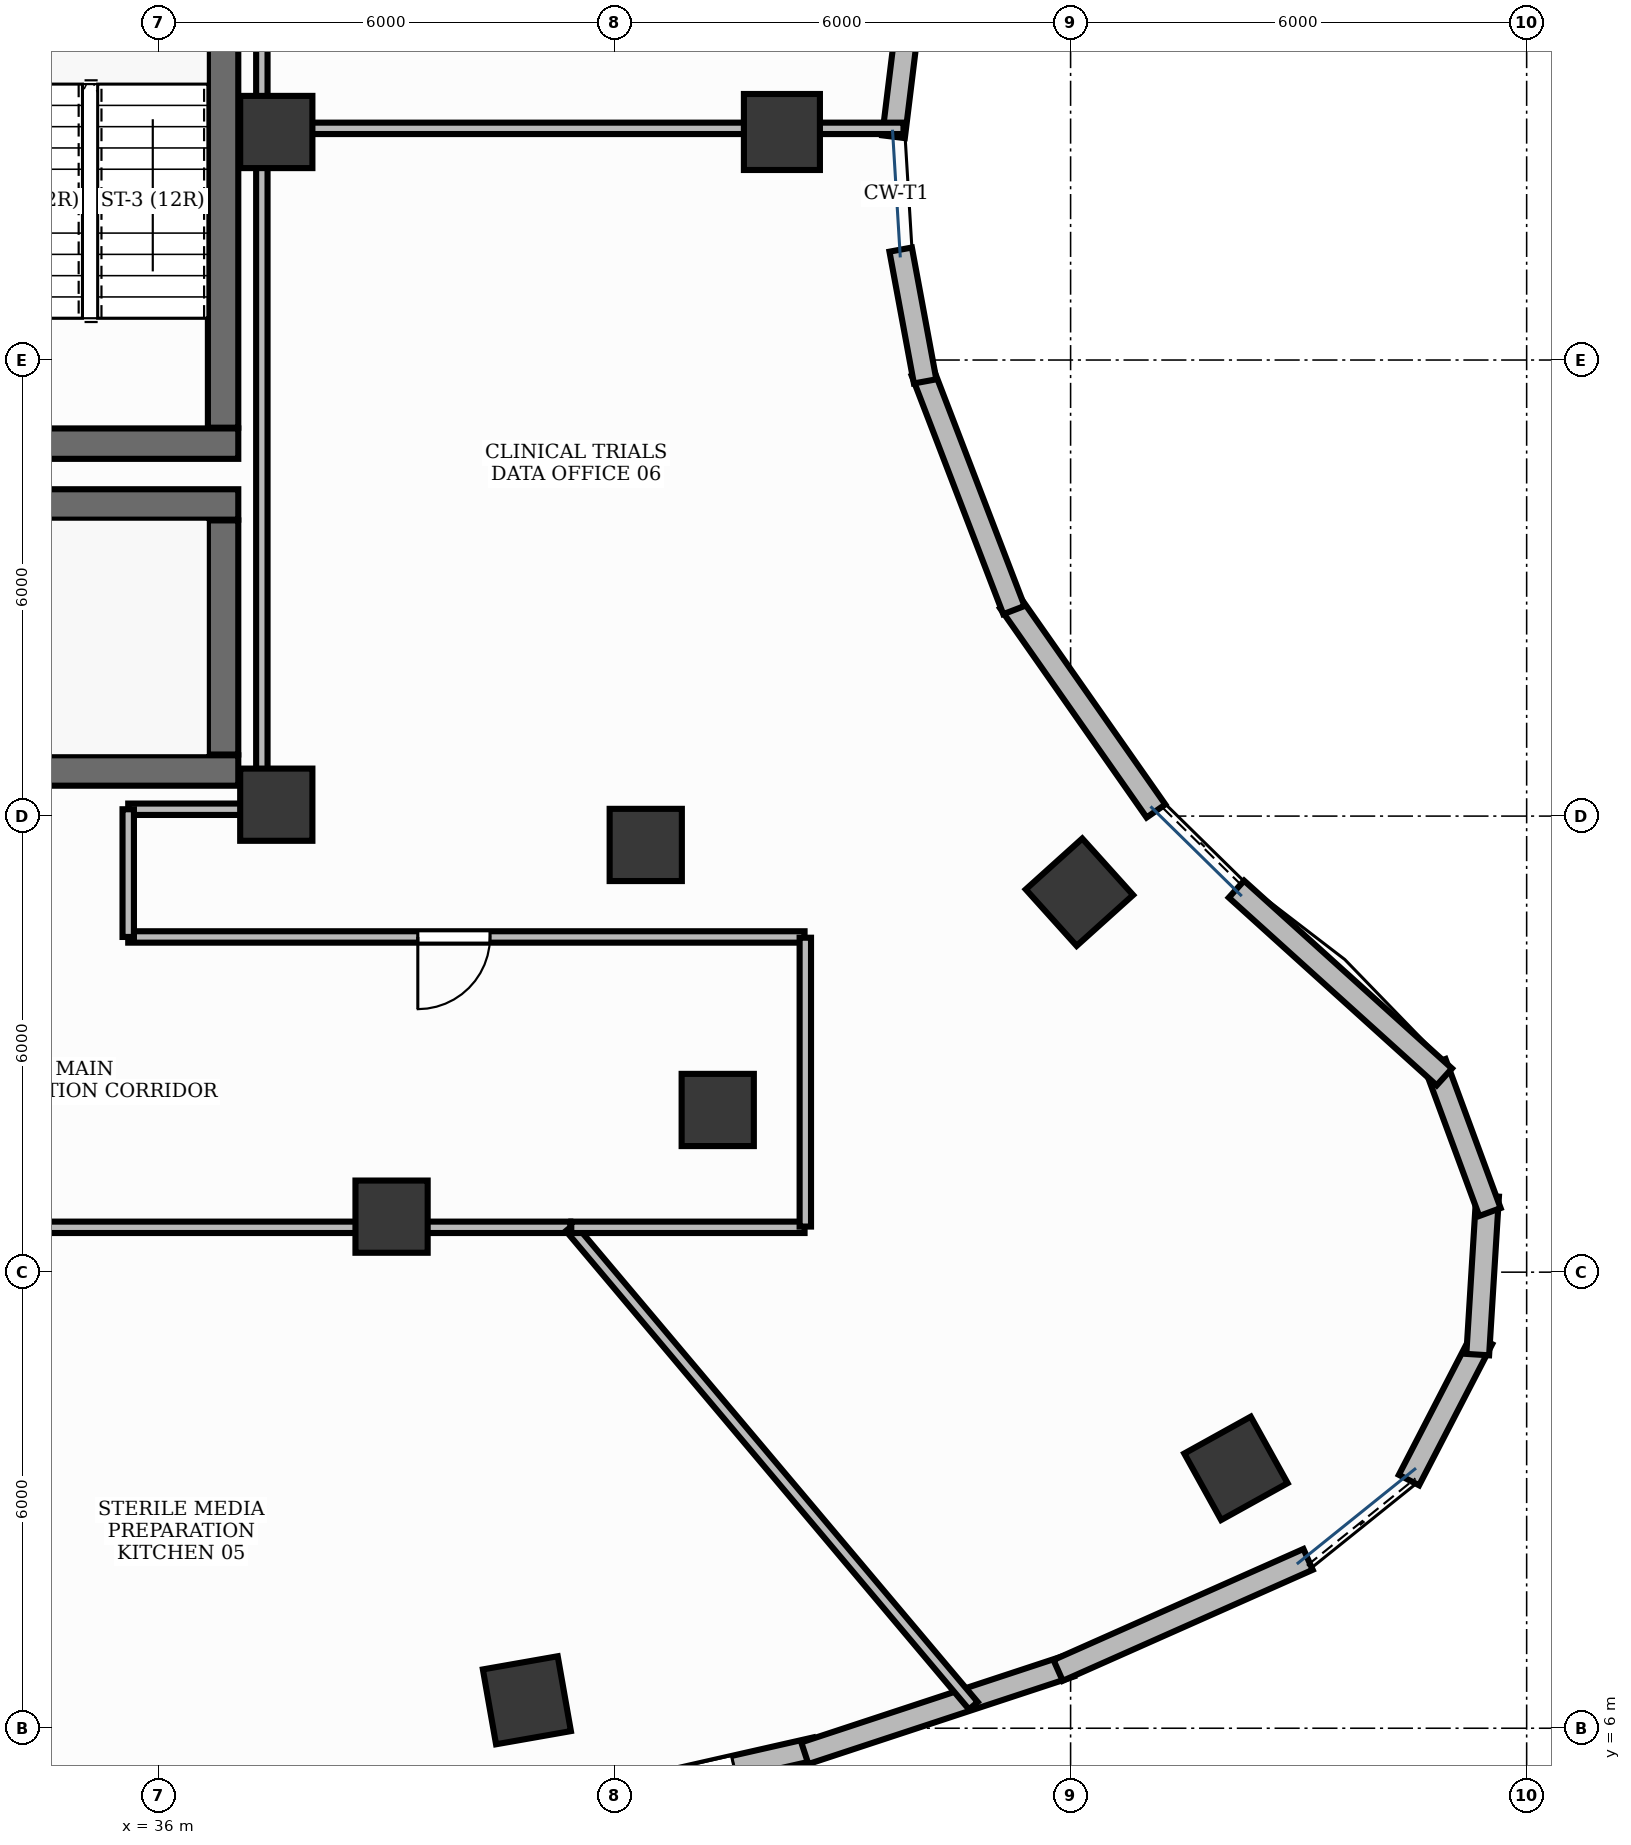
"""IFC4 building model, lengths in metres.
Left out: names, types, materials, properties, quantities, classifications, styles, units other than length and angle.
Written with IfcOpenShell. Run it as: python <this file> out.ifc"""

import sys

from ifc_helpers import new_model, si_unit, direction, frame, frame_2d, origin, origin_2d, place, context, subcontext, project, spatial, rectangle, extrude, element, fill, save


model = new_model("IFC4")
c1 = context("Model", 3, precision=1e-05, world=origin(), true_north=direction((0.0, 1.0)))
c2 = subcontext(c1, "Body", "Model", "MODEL_VIEW")
j1 = project(units=[si_unit("LENGTHUNIT", "METRE"), si_unit("PLANEANGLEUNIT", "RADIAN")], contexts=[c1])
p1 = place(None, origin())
s1 = spatial("IfcSite", under=j1, at=p1, CompositionType="ELEMENT")
p2 = place(p1, origin())
s2 = spatial("IfcBuilding", under=s1, at=p2, CompositionType="ELEMENT")
p3 = place(p2, frame((0.0, 0.0, 226.8)))
s3 = spatial("IfcBuildingStorey", under=s2, at=p3, CompositionType="ELEMENT", Elevation=226.8)
p4 = place(p3, frame((28.852, 18.6, 0.0), z_axis=(0.0, 0.0, 1.0), x_axis=(1.0, 0.0, 0.0)))
e1 = element("IfcWall", 1, at=p4, inside=s3, PredefinedType="SHEAR", context=c2, shape_type="SweptSolid", body=[
    extrude(rectangle(XDim=8.198, YDim=0.4, at=frame_2d((4.099, 0.0))), origin(), (0.0, 0.0, 1.0), 3.9),
])
p5 = place(p3, frame((28.4, 22.1, 0.0), z_axis=(0.0, 0.0, 1.0), x_axis=(1.0, 0.0, 0.0)))
e2 = element("IfcWall", 2, at=p5, inside=s3, PredefinedType="SHEAR", context=c2, shape_type="SweptSolid", body=[
    extrude(rectangle(XDim=8.65, YDim=0.4, at=frame_2d((4.325, 0.0))), origin(), (0.0, 0.0, 1.0), 3.9),
])
p6 = place(p3, frame((36.85, 18.81, 0.0), z_axis=(0.0, 0.0, 1.0), x_axis=(0.0, 1.0, 0.0)))
e3 = element("IfcWall", 3, at=p6, inside=s3, PredefinedType="SHEAR", context=c2, shape_type="SweptSolid", body=[
    extrude(rectangle(XDim=3.08, YDim=0.4, at=frame_2d((1.54, 0.0))), origin(), (0.0, 0.0, 1.0), 3.9),
])
p7 = place(p3, frame((33.15, 22.9, 0.0), z_axis=(0.0, 0.0, 1.0), x_axis=(1.0, 0.0, 0.0)))
e4 = element("IfcWall", 4, at=p7, inside=s3, PredefinedType="SHEAR", context=c2, shape_type="SweptSolid", body=[
    extrude(rectangle(XDim=3.9, YDim=0.4, at=frame_2d((1.95, 0.0))), origin(), (0.0, 0.0, 1.0), 3.9),
])
p8 = place(p3, frame((36.85, 23.11, 0.0), z_axis=(0.0, 0.0, 1.0), x_axis=(0.0, 1.0, 0.0)))
e5 = element("IfcWall", 5, at=p8, inside=s3, PredefinedType="SHEAR", context=c2, shape_type="SweptSolid", body=[
    extrude(rectangle(XDim=7.78, YDim=0.4, at=frame_2d((3.89, 0.0))), origin(), (0.0, 0.0, 1.0), 3.9),
])
for number, where, z_axis, x_axis in (
    (6, (37.55, 18.15, -0.0), (0.0, 0.0, 1.0), (1.0, 0.0, 0.0)),
    (7, (37.55, 27.0, -0.0), (0.0, 0.0, 1.0), (1.0, 0.0, 0.0)),
):
    element("IfcColumn", number, at=place(p3, frame(where, z_axis=z_axis, x_axis=x_axis)), inside=s3, PredefinedType="PILASTER", context=c2, shape_type="SweptSolid", body=[
        extrude(rectangle(XDim=0.95, YDim=0.95, at=origin_2d()), origin(), (0.0, 0.0, 1.0), 3.901),
    ])
p9 = place(p3, frame((40.847, 6.368, -0.0), z_axis=(0.0, 0.0, 1.0), x_axis=(0.984868307662, 0.173304404339, 0.0)))
e8 = element("IfcColumn", 8, at=p9, inside=s3, PredefinedType="COLUMN", context=c2, shape_type="SweptSolid", body=[
    extrude(rectangle(XDim=1.0, YDim=1.0, at=origin_2d()), origin(), (0.0, 0.0, 1.0), 3.901),
])
p10 = place(p3, frame((39.067, 12.73, -0.0), z_axis=(0.0, 0.0, 1.0), x_axis=(1.0, 0.0, 0.0)))
e9 = element("IfcColumn", 9, at=p10, inside=s3, PredefinedType="COLUMN", context=c2, shape_type="SweptSolid", body=[
    extrude(rectangle(XDim=0.95, YDim=0.95, at=origin_2d()), origin(), (0.0, 0.0, 1.0), 3.901),
])
p11 = place(p3, frame((50.176, 9.419, -0.0), z_axis=(0.0, 0.0, 1.0), x_axis=(0.874535078577, 0.484962262797, 0.0)))
e10 = element("IfcColumn", 10, at=p11, inside=s3, PredefinedType="COLUMN", context=c2, shape_type="SweptSolid", body=[
    extrude(rectangle(XDim=1.0, YDim=1.0, at=origin_2d()), origin(), (0.0, 0.0, 1.0), 3.901),
])
p12 = place(p3, frame((43.358, 14.134, -0.0), z_axis=(0.0, 0.0, 1.0), x_axis=(1.0, 0.0, 0.0)))
e11 = element("IfcColumn", 11, at=p12, inside=s3, PredefinedType="COLUMN", context=c2, shape_type="SweptSolid", body=[
    extrude(rectangle(XDim=0.95, YDim=0.95, at=origin_2d()), origin(), (0.0, 0.0, 1.0), 3.901),
])
p13 = place(p3, frame((48.116, 16.999, -0.0), z_axis=(0.0, 0.0, 1.0), x_axis=(-0.669130606359, 0.743144825477, 0.0)))
e12 = element("IfcColumn", 12, at=p13, inside=s3, PredefinedType="COLUMN", context=c2, shape_type="SweptSolid", body=[
    extrude(rectangle(XDim=1.0, YDim=1.0, at=origin_2d()), origin(), (0.0, 0.0, 1.0), 3.901),
])
p14 = place(p3, frame((42.411, 17.62, -0.0), z_axis=(0.0, 0.0, 1.0), x_axis=(1.0, 0.0, 0.0)))
e13 = element("IfcColumn", 13, at=p14, inside=s3, PredefinedType="COLUMN", context=c2, shape_type="SweptSolid", body=[
    extrude(rectangle(XDim=0.95, YDim=0.95, at=origin_2d()), origin(), (0.0, 0.0, 1.0), 3.901),
])
p15 = place(p3, frame((44.202, 27.0, -0.0), z_axis=(0.0, 0.0, 1.0), x_axis=(0.0, 1.0, 0.0)))
e14 = element("IfcColumn", 14, at=p15, inside=s3, PredefinedType="COLUMN", context=c2, shape_type="SweptSolid", body=[
    extrude(rectangle(XDim=1.0, YDim=1.0, at=origin_2d()), origin(), (0.0, 0.0, 1.0), 3.901),
])
p16 = place(p3, frame((41.036, 4.914, 0.0), z_axis=(0.0, 0.0, 1.0), x_axis=(0.975237678872, 0.221159376263, 0.0)))
e15 = element("IfcWall", 15, at=p16, inside=s3, PredefinedType="STANDARD", context=c2, shape_type="SweptSolid", body=[
    extrude(rectangle(XDim=3.703, YDim=0.3, at=frame_2d((1.851, 0.0))), origin(), (0.0, 0.0, 1.0), 3.9),
])
p17 = place(p16, frame((1.101, 0.0, 0.95)))
e16 = element("IfcOpeningElement", 16, at=p17, cuts=e15, PredefinedType="OPENING", context=c2, shape_type="SweptSolid", body=[
    extrude(rectangle(XDim=1.5, YDim=1.8, at=frame_2d((0.75, 0.9))), frame((0.0, 0.165, 0.0), z_axis=(0.0, -1.0, 0.0), x_axis=(1.0, 0.0, 0.0)), (0.0, 0.0, 1.0), 0.33),
])
p18 = place(p3, frame((44.504, 5.671, 0.0), z_axis=(0.0, 0.0, 1.0), x_axis=(0.94972655205, 0.313080622734, 0.0)))
e17 = element("IfcWall", 17, at=p18, inside=s3, PredefinedType="STANDARD", context=c2, shape_type="SweptSolid", body=[
    extrude(rectangle(XDim=3.679, YDim=0.3, at=frame_2d((1.84, 0.0))), origin(), (0.0, 0.0, 1.0), 3.9),
])
p19 = place(p3, frame((47.836, 6.761, 0.0), z_axis=(0.0, 0.0, 1.0), x_axis=(0.913940198441, 0.405848880341, 0.0)))
e18 = element("IfcWall", 18, at=p19, inside=s3, PredefinedType="STANDARD", context=c2, shape_type="SweptSolid", body=[
    extrude(rectangle(XDim=3.598, YDim=0.3, at=frame_2d((1.799, 0.0))), origin(), (0.0, 0.0, 1.0), 3.9),
])
p20 = place(p3, frame((52.452, 9.265, 0.0), z_axis=(0.0, 0.0, 1.0), x_axis=(0.459683297138, 0.888082916361, 0.0)))
e19 = element("IfcWall", 19, at=p20, inside=s3, PredefinedType="STANDARD", context=c2, shape_type="SweptSolid", body=[
    extrude(rectangle(XDim=2.092, YDim=0.3, at=frame_2d((1.046, 0.0))), origin(), (0.0, 0.0, 1.0), 3.9),
])
for number, where, z_axis, x_axis in (
    (20, (53.356, 10.915, 0.0), (0.0, 0.0, 1.0), (0.062, 0.998, 0.0)),
    (21, (53.517, 12.791, 0.0), (0.0, 0.0, 1.0), (-0.346, 0.938, 0.0)),
):
    element("IfcWall", number, at=place(p3, frame(where, z_axis=z_axis, x_axis=x_axis)), inside=s3, PredefinedType="STANDARD", context=c2, shape_type="SweptSolid", body=[
        extrude(rectangle(XDim=2.091, YDim=0.3, at=frame_2d((1.046, 0.0))), origin(), (0.0, 0.0, 1.0), 3.9),
    ])
p21 = place(p3, frame((52.917, 14.569, 0.0), z_axis=(0.0, 0.0, 1.0), x_axis=(-0.742037796493, 0.670358045059, 0.0)))
e22 = element("IfcWall", 22, at=p21, inside=s3, PredefinedType="STANDARD", context=c2, shape_type="SweptSolid", body=[
    extrude(rectangle(XDim=3.685, YDim=0.3, at=frame_2d((1.843, 0.0))), origin(), (0.0, 0.0, 1.0), 3.9),
])
p22 = place(p3, frame((49.123, 18.067, 0.0), z_axis=(0.0, 0.0, 1.0), x_axis=(-0.573598849051, 0.819136350291, 0.0)))
e23 = element("IfcWall", 23, at=p22, inside=s3, PredefinedType="STANDARD", context=c2, shape_type="SweptSolid", body=[
    extrude(rectangle(XDim=3.361, YDim=0.3, at=frame_2d((1.68, 0.0))), origin(), (0.0, 0.0, 1.0), 3.9),
])
p23 = place(p3, frame((47.254, 20.71, 0.0), z_axis=(0.0, 0.0, 1.0), x_axis=(-0.358365624917, 0.933581318835, 0.0)))
e24 = element("IfcWall", 24, at=p23, inside=s3, PredefinedType="STANDARD", context=c2, shape_type="SweptSolid", body=[
    extrude(rectangle(XDim=3.361, YDim=0.3, at=frame_2d((1.68, 0.0))), origin(), (0.0, 0.0, 1.0), 3.9),
])
p24 = place(p3, frame((46.086, 23.719, 0.0), z_axis=(0.0, 0.0, 1.0), x_axis=(-0.182198328631, 0.983261800867, 0.0)))
e25 = element("IfcWall", 25, at=p24, inside=s3, PredefinedType="STANDARD", context=c2, shape_type="SweptSolid", body=[
    extrude(rectangle(XDim=1.763, YDim=0.3, at=frame_2d((0.882, 0.0))), origin(), (0.0, 0.0, 1.0), 3.9),
])
p25 = place(p3, frame((45.67, 26.938, 0.0), z_axis=(0.0, 0.0, 1.0), x_axis=(0.121834797873, 0.992550392689, 0.0)))
e26 = element("IfcWall", 26, at=p25, inside=s3, PredefinedType="STANDARD", context=c2, shape_type="SweptSolid", body=[
    extrude(rectangle(XDim=3.361, YDim=0.3, at=frame_2d((1.68, 0.0))), origin(), (0.0, 0.0, 1.0), 3.9),
])
p26 = place(p3, frame((29.612, 12.59, 0.0), z_axis=(0.0, 0.0, 1.0), x_axis=(1.0, 0.0, 0.0)))
e27 = element("IfcWall", 27, at=p26, inside=s3, PredefinedType="PARTITIONING", context=c2, shape_type="SweptSolid", body=[
    extrude(rectangle(XDim=11.806, YDim=0.15, at=frame_2d((5.903, 0.0))), origin(), (0.0, 0.0, 1.0), 2.91),
])
p27 = place(p26, frame((0.24, 0.0, 0.0)))
e28 = element("IfcOpeningElement", 28, at=p27, cuts=e27, PredefinedType="OPENING", context=c2, shape_type="SweptSolid", body=[
    extrude(rectangle(XDim=0.95, YDim=2.15, at=frame_2d((0.475, 1.075))), frame((0.0, 0.09, 0.0), z_axis=(0.0, -1.0, 0.0), x_axis=(1.0, 0.0, 0.0)), (0.0, 0.0, 1.0), 0.18),
])
p28 = place(p3, frame((44.5, 16.41, 0.0), z_axis=(0.0, 0.0, 1.0), x_axis=(-1.0, 0.0, 0.0)))
e29 = element("IfcWall", 29, at=p28, inside=s3, PredefinedType="PARTITIONING", context=c2, shape_type="SweptSolid", body=[
    extrude(rectangle(XDim=8.898, YDim=0.15, at=frame_2d((4.449, 0.0))), origin(), (0.0, 0.0, 1.0), 2.91),
])
p29 = place(p28, frame((4.138, 0.0, 0.0)))
e30 = element("IfcOpeningElement", 30, at=p29, cuts=e29, PredefinedType="OPENING", context=c2, shape_type="SweptSolid", body=[
    extrude(rectangle(XDim=0.95, YDim=2.15, at=frame_2d((0.475, 1.075))), frame((0.0, 0.09, 0.0), z_axis=(0.0, -1.0, 0.0), x_axis=(1.0, 0.0, 0.0)), (0.0, 0.0, 1.0), 0.18),
])
p30 = place(p3, frame((41.418, 12.59, 0.0), z_axis=(0.0, 0.0, 1.0), x_axis=(0.644315695233, -0.764759625554, 0.0)))
e31 = element("IfcWall", 31, at=p30, inside=s3, PredefinedType="PARTITIONING", context=c2, shape_type="SweptSolid", body=[
    extrude(rectangle(XDim=8.23, YDim=0.15, at=frame_2d((4.115, 0.0))), origin(), (0.0, 0.0, 1.0), 2.91),
])
p31 = place(p3, frame((35.602, 18.09, 0.0), z_axis=(0.0, 0.0, 1.0), x_axis=(1.0, 0.0, 0.0)))
e32 = element("IfcWall", 32, at=p31, inside=s3, PredefinedType="PARTITIONING", context=c2, shape_type="SweptSolid", body=[
    extrude(rectangle(XDim=1.748, YDim=0.15, at=frame_2d((0.874, 0.0))), origin(), (0.0, 0.0, 1.0), 2.91),
])
p32 = place(p3, frame((37.36, 18.1, 0.0), z_axis=(0.0, 0.0, 1.0), x_axis=(0.0, 1.0, 0.0)))
e33 = element("IfcWall", 33, at=p32, inside=s3, PredefinedType="PARTITIONING", context=c2, shape_type="SweptSolid", body=[
    extrude(rectangle(XDim=8.948, YDim=0.15, at=frame_2d((4.474, 0.0))), origin(), (0.0, 0.0, 1.0), 2.91),
])
p33 = place(p3, frame((37.36, 27.048, 0.0), z_axis=(0.0, 0.0, 1.0), x_axis=(1.0, 0.0, 0.0)))
e34 = element("IfcWall", 34, at=p33, inside=s3, PredefinedType="PARTITIONING", context=c2, shape_type="SweptSolid", body=[
    extrude(rectangle(XDim=8.441, YDim=0.15, at=frame_2d((4.221, 0.0))), origin(), (0.0, 0.0, 1.0), 2.91),
])
p34 = place(p3, frame((41.431, 12.59, 0.0), z_axis=(0.0, 0.0, 1.0), x_axis=(1.0, 0.0, 0.0)))
e35 = element("IfcWall", 35, at=p34, inside=s3, PredefinedType="PARTITIONING", context=c2, shape_type="SweptSolid", body=[
    extrude(rectangle(XDim=3.069, YDim=0.15, at=frame_2d((1.535, 0.0))), origin(), (0.0, 0.0, 1.0), 2.91),
])
p35 = place(p3, frame((44.51, 12.6, 0.0), z_axis=(0.0, 0.0, 1.0), x_axis=(0.0, 1.0, 0.0)))
e36 = element("IfcWall", 36, at=p35, inside=s3, PredefinedType="PARTITIONING", context=c2, shape_type="SweptSolid", body=[
    extrude(rectangle(XDim=3.8, YDim=0.15, at=frame_2d((1.9, 0.0))), origin(), (0.0, 0.0, 1.0), 2.91),
])
p36 = place(p3, frame((35.602, 16.41, 0.0), z_axis=(0.0, 0.0, 1.0), x_axis=(0.0, 1.0, 0.0)))
e37 = element("IfcWall", 37, at=p36, inside=s3, PredefinedType="PARTITIONING", context=c2, shape_type="SweptSolid", body=[
    extrude(rectangle(XDim=1.68, YDim=0.15, at=frame_2d((0.84, 0.0))), origin(), (0.0, 0.0, 1.0), 2.91),
])
p37 = place(p3, frame((37.36, 27.058, 0.0), z_axis=(0.0, 0.0, 1.0), x_axis=(0.0, 1.0, 0.0)))
e38 = element("IfcWall", 38, at=p37, inside=s3, PredefinedType="PARTITIONING", context=c2, shape_type="SweptSolid", body=[
    extrude(rectangle(XDim=8.842, YDim=0.15, at=frame_2d((4.421, 0.0))), origin(), (0.0, 0.0, 1.0), 2.91),
])
p38 = place(p17, origin())
e39 = element("IfcWindow", 39, at=p38, inside=s3, PartitioningType="DOUBLE_PANEL_VERTICAL", PredefinedType="WINDOW", context=c2, shape_type="SweptSolid", body=[
    extrude(rectangle(XDim=1.5, YDim=1.8, at=frame_2d((0.75, 0.9))), frame((0.0, 0.03, 0.0), z_axis=(0.0, -1.0, 0.0), x_axis=(1.0, 0.0, 0.0)), (0.0, 0.0, 1.0), 0.06),
])
fill(e16, e39)
p39 = place(p29, origin())
e40 = element("IfcDoor", 40, at=p39, inside=s3, OperationType="SINGLE_SWING_RIGHT", PredefinedType="DOOR", context=c2, shape_type="SweptSolid", body=[
    extrude(rectangle(XDim=0.95, YDim=2.15, at=frame_2d((0.475, 1.075))), frame((0.0, 0.025, 0.0), z_axis=(0.0, -1.0, 0.0), x_axis=(1.0, 0.0, 0.0)), (0.0, 0.0, 1.0), 0.05),
])
fill(e30, e40)
save(model, sys.argv[1])
